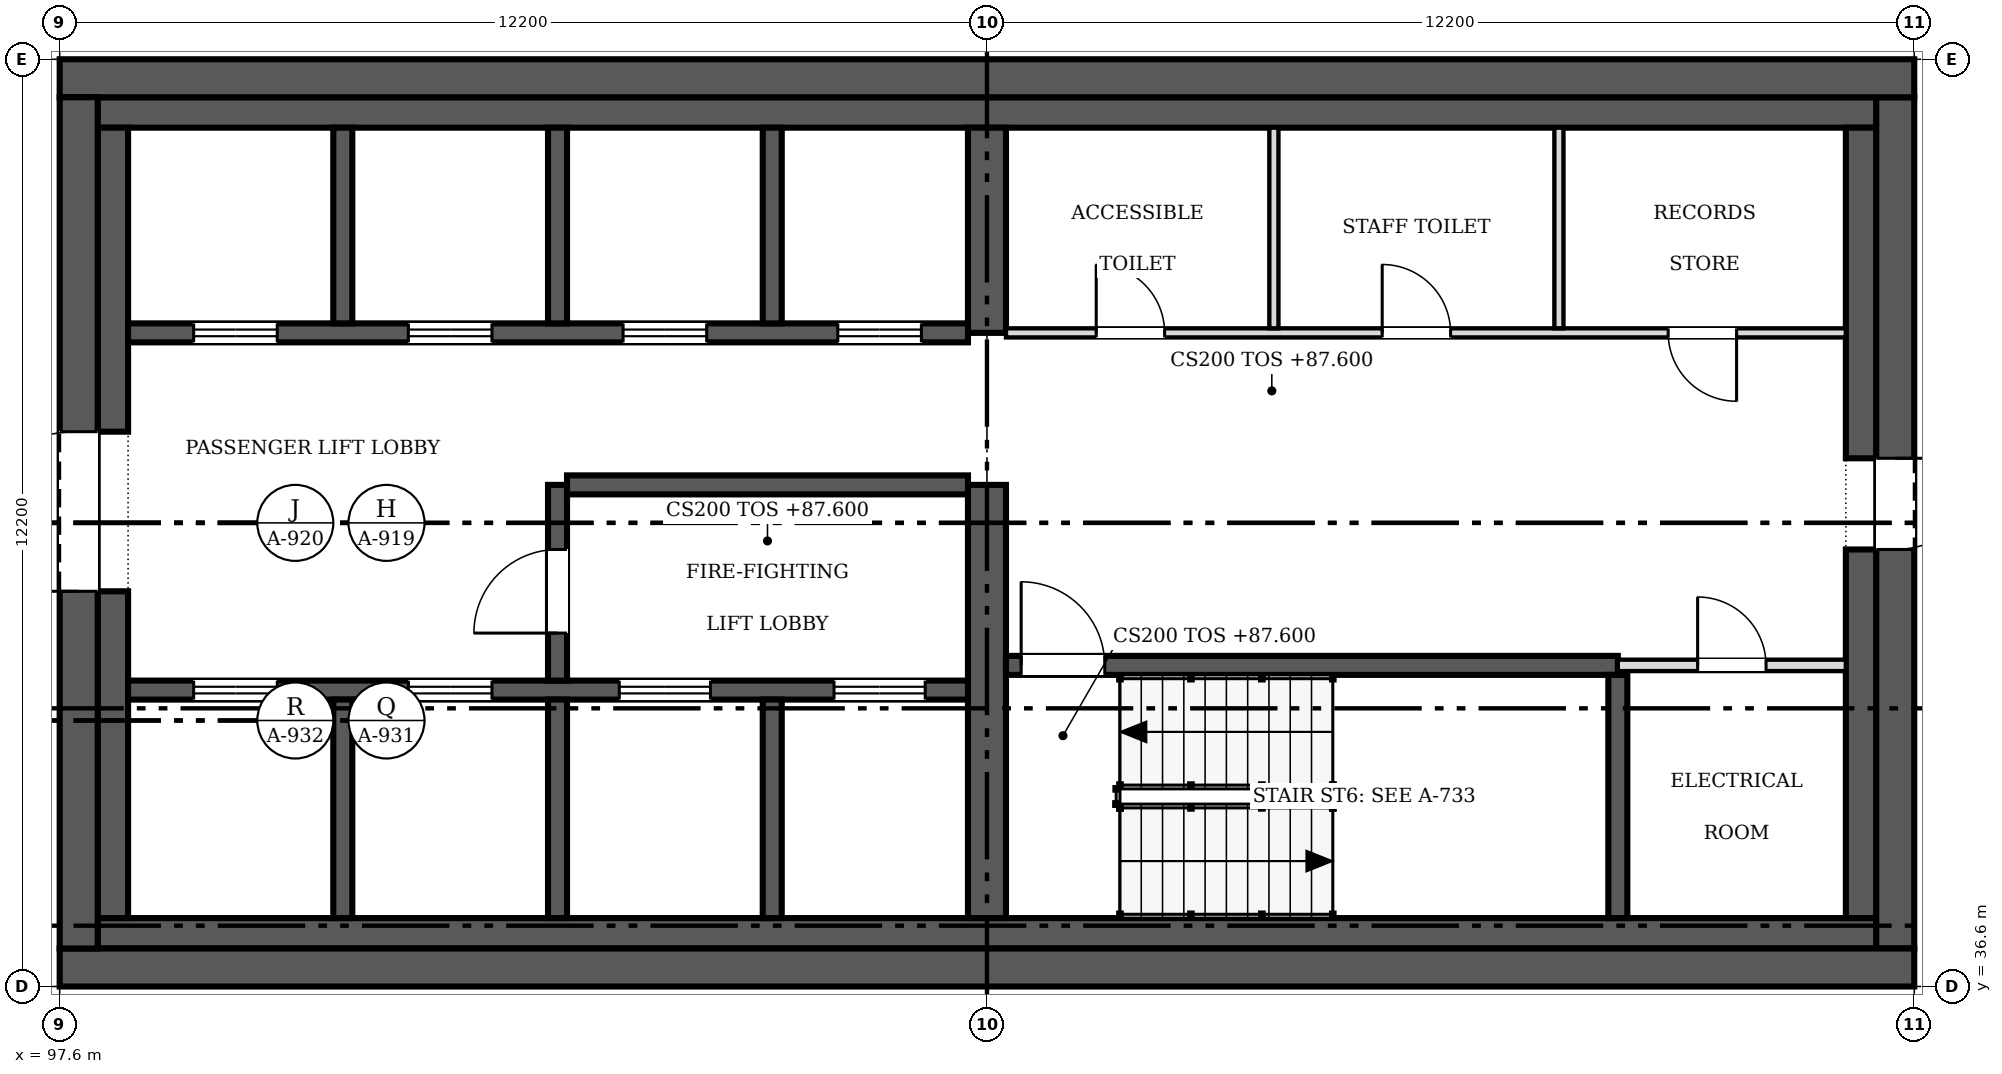
"""IFC4 building model, lengths in metres.
Left out: names, types, materials, properties, quantities, classifications, styles, units other than length and angle.
Written with IfcOpenShell. Run it as: python <this file> out.ifc"""

import sys

from ifc_helpers import new_model, si_unit, direction, frame, frame_2d, origin, place, context, subcontext, project, spatial, rectangle, extrude, source, transform, mapped, element, fill, save


model = new_model("IFC4")
c1 = context("Model", 3, precision=1e-05, world=origin(), true_north=direction((0.0, 1.0)))
c2 = subcontext(c1, "Body", "Model", "MODEL_VIEW")
j1 = project(units=[si_unit("LENGTHUNIT", "METRE"), si_unit("PLANEANGLEUNIT", "RADIAN")], contexts=[c1])
p1 = place(None, origin())
s1 = spatial("IfcSite", under=j1, at=p1, CompositionType="ELEMENT")
p2 = place(p1, origin())
s2 = spatial("IfcBuilding", under=s1, at=p2, CompositionType="ELEMENT")
p3 = place(p2, frame((0.0, 0.0, 87.6)))
s3 = spatial("IfcBuildingStorey", under=s2, at=p3, CompositionType="ELEMENT", Elevation=87.6)
p4 = place(p3, frame((122.0, 36.85, 0.0), z_axis=(0.0, 0.0, 1.0), x_axis=(-1.0, 0.0, 0.0)))
e1 = element("IfcWall", 1, at=p4, inside=s3, PredefinedType="SHEAR", context=c2, shape_type="SweptSolid", body=[
    extrude(rectangle(XDim=24.4, YDim=0.5, at=frame_2d((12.2, 0.0))), origin(), (0.0, 0.0, 1.0), 3.8),
])
p5 = place(p3, frame((97.85, 37.1, 0.0), z_axis=(0.0, 0.0, 1.0), x_axis=(0.0, 1.0, 0.0)))
e2 = element("IfcWall", 2, at=p5, inside=s3, PredefinedType="SHEAR", context=c2, shape_type="SweptSolid", body=[
    extrude(rectangle(XDim=11.2, YDim=0.5, at=frame_2d((5.6, 0.0))), origin(), (0.0, 0.0, 1.0), 3.8),
])
m1 = source(origin(), c2, "Body", "SweptSolid", [
    extrude(rectangle(XDim=2.1, YDim=2.4, at=frame_2d((1.05, 1.2))), frame((0.0, 0.26, 0.0), z_axis=(0.0, -1.0, 0.0), x_axis=(1.0, 0.0, 0.0)), (0.0, 0.0, 1.0), 0.52),
])
p6 = place(p5, frame((4.7, 0.0, 0.0)))
e3 = element("IfcOpeningElement", 3, at=p6, cuts=e2, PredefinedType="OPENING", context=c2, shape_type="MappedRepresentation", body=[
    mapped(m1, transform((0.0, 0.0, 0.0), scale=1.0)),
])
p7 = place(p3, frame((97.6, 48.55, 0.0), z_axis=(0.0, 0.0, 1.0), x_axis=(1.0, 0.0, 0.0)))
e4 = element("IfcWall", 4, at=p7, inside=s3, PredefinedType="SHEAR", context=c2, shape_type="SweptSolid", body=[
    extrude(rectangle(XDim=24.4, YDim=0.5, at=frame_2d((12.2, 0.0))), origin(), (0.0, 0.0, 1.0), 3.8),
])
p8 = place(p3, frame((121.75, 48.3, 0.0), z_axis=(0.0, 0.0, 1.0), x_axis=(0.0, -1.0, 0.0)))
e5 = element("IfcWall", 5, at=p8, inside=s3, PredefinedType="SHEAR", context=c2, shape_type="SweptSolid", body=[
    extrude(rectangle(XDim=11.2, YDim=0.5, at=frame_2d((5.6, 0.0))), origin(), (0.0, 0.0, 1.0), 3.8),
])
m2 = source(origin(), c2, "Body", "SweptSolid", [
    extrude(rectangle(XDim=1.2, YDim=2.1, at=frame_2d((0.6, 1.05))), frame((0.0, 0.26, 0.0), z_axis=(0.0, -1.0, 0.0), x_axis=(1.0, 0.0, 0.0)), (0.0, 0.0, 1.0), 0.52),
])
p9 = place(p8, frame((4.75, 0.0, 0.0)))
e6 = element("IfcOpeningElement", 6, at=p9, cuts=e5, PredefinedType="OPENING", context=c2, shape_type="MappedRepresentation", body=[
    mapped(m2, transform((0.0, 0.0, 0.0), scale=1.0)),
])
for number, where, z_axis, x_axis in (
    (7, (98.1, 37.3, 0.0), (0.0, 0.0, 1.0), (1.0, 0.0, 0.0)),
    (8, (98.1, 48.1, 0.0), (0.0, 0.0, 1.0), (1.0, 0.0, 0.0)),
):
    element("IfcWall", number, at=place(p3, frame(where, z_axis=z_axis, x_axis=x_axis)), inside=s3, PredefinedType="SOLIDWALL", context=c2, shape_type="SweptSolid", body=[
        extrude(rectangle(XDim=23.4, YDim=0.4, at=frame_2d((11.7, 0.0))), origin(), (0.0, 0.0, 1.0), 3.8),
    ])
p10 = place(p3, frame((98.3, 37.5, 0.0), z_axis=(0.0, 0.0, 1.0), x_axis=(0.0, 1.0, 0.0)))
e9 = element("IfcWall", 9, at=p10, inside=s3, PredefinedType="SOLIDWALL", context=c2, shape_type="SweptSolid", body=[
    extrude(rectangle(XDim=4.3, YDim=0.4, at=frame_2d((2.15, 0.0))), origin(), (0.0, 0.0, 1.0), 3.8),
])
p11 = place(p3, frame((98.3, 43.9, 0.0), z_axis=(0.0, 0.0, 1.0), x_axis=(0.0, 1.0, 0.0)))
e10 = element("IfcWall", 10, at=p11, inside=s3, PredefinedType="SOLIDWALL", context=c2, shape_type="SweptSolid", body=[
    extrude(rectangle(XDim=4.0, YDim=0.4, at=frame_2d((2.0, 0.0))), origin(), (0.0, 0.0, 1.0), 3.8),
])
p12 = place(p3, frame((121.3, 37.5, 0.0), z_axis=(0.0, 0.0, 1.0), x_axis=(0.0, 1.0, 0.0)))
e11 = element("IfcWall", 11, at=p12, inside=s3, PredefinedType="SOLIDWALL", context=c2, shape_type="SweptSolid", body=[
    extrude(rectangle(XDim=4.85, YDim=0.4, at=frame_2d((2.425, 0.0))), origin(), (0.0, 0.0, 1.0), 3.8),
])
p13 = place(p3, frame((121.3, 43.55, 0.0), z_axis=(0.0, 0.0, 1.0), x_axis=(0.0, 1.0, 0.0)))
e12 = element("IfcWall", 12, at=p13, inside=s3, PredefinedType="SOLIDWALL", context=c2, shape_type="SweptSolid", body=[
    extrude(rectangle(XDim=4.35, YDim=0.4, at=frame_2d((2.175, 0.0))), origin(), (0.0, 0.0, 1.0), 3.8),
])
p14 = place(p3, frame((109.8, 37.5, 0.0), z_axis=(0.0, 0.0, 1.0), x_axis=(0.0, 1.0, 0.0)))
e13 = element("IfcWall", 13, at=p14, inside=s3, PredefinedType="SHEAR", context=c2, shape_type="SweptSolid", body=[
    extrude(rectangle(XDim=5.7, YDim=0.5, at=frame_2d((2.85, 0.0))), origin(), (0.0, 0.0, 1.0), 3.8),
])
p15 = place(p3, frame((109.8, 45.2, 0.0), z_axis=(0.0, 0.0, 1.0), x_axis=(0.0, 1.0, 0.0)))
e14 = element("IfcWall", 14, at=p15, inside=s3, PredefinedType="SHEAR", context=c2, shape_type="SweptSolid", body=[
    extrude(rectangle(XDim=2.7, YDim=0.5, at=frame_2d((1.35, 0.0))), origin(), (0.0, 0.0, 1.0), 3.8),
])
p16 = place(p3, frame((98.5, 40.5, 0.0), z_axis=(0.0, 0.0, 1.0), x_axis=(1.0, 0.0, 0.0)))
e15 = element("IfcWall", 15, at=p16, inside=s3, PredefinedType="SOLIDWALL", context=c2, shape_type="SweptSolid", body=[
    extrude(rectangle(XDim=11.05, YDim=0.25, at=frame_2d((5.525, 0.0))), origin(), (0.0, 0.0, 1.0), 3.8),
])
m3 = source(origin(), c2, "Body", "SweptSolid", [
    extrude(rectangle(XDim=1.1, YDim=2.1, at=frame_2d((0.55, 1.05))), frame((0.0, 0.135, 0.0), z_axis=(0.0, -1.0, 0.0), x_axis=(1.0, 0.0, 0.0)), (0.0, 0.0, 1.0), 0.27),
])
p17 = place(p16, frame((0.863, 0.0, 0.0)))
e16 = element("IfcOpeningElement", 16, at=p17, cuts=e15, PredefinedType="OPENING", context=c2, shape_type="MappedRepresentation", body=[
    mapped(m3, transform((0.0, 0.0, 0.0), scale=1.0)),
])
p18 = place(p16, frame((3.688, 0.0, 0.0)))
e17 = element("IfcOpeningElement", 17, at=p18, cuts=e15, PredefinedType="OPENING", context=c2, shape_type="MappedRepresentation", body=[
    mapped(m3, transform((0.0, 0.0, 0.0), scale=1.0)),
])
m4 = source(origin(), c2, "Body", "SweptSolid", [
    extrude(rectangle(XDim=1.2, YDim=2.1, at=frame_2d((0.6, 1.05))), frame((0.0, 0.135, 0.0), z_axis=(0.0, -1.0, 0.0), x_axis=(1.0, 0.0, 0.0)), (0.0, 0.0, 1.0), 0.27),
])
p19 = place(p16, frame((6.462, 0.0, 0.0)))
e18 = element("IfcOpeningElement", 18, at=p19, cuts=e15, PredefinedType="OPENING", context=c2, shape_type="MappedRepresentation", body=[
    mapped(m4, transform((0.0, 0.0, 0.0), scale=1.0)),
])
p20 = place(p16, frame((9.288, 0.0, 0.0)))
e19 = element("IfcOpeningElement", 19, at=p20, cuts=e15, PredefinedType="OPENING", context=c2, shape_type="MappedRepresentation", body=[
    mapped(m4, transform((0.0, 0.0, 0.0), scale=1.0)),
])
p21 = place(p3, frame((109.55, 45.2, 0.0), z_axis=(0.0, 0.0, 1.0), x_axis=(-1.0, 0.0, 0.0)))
e20 = element("IfcWall", 20, at=p21, inside=s3, PredefinedType="SOLIDWALL", context=c2, shape_type="SweptSolid", body=[
    extrude(rectangle(XDim=11.05, YDim=0.25, at=frame_2d((5.525, 0.0))), origin(), (0.0, 0.0, 1.0), 3.8),
])
p22 = place(p21, frame((9.087, 0.0, 0.0)))
e21 = element("IfcOpeningElement", 21, at=p22, cuts=e20, PredefinedType="OPENING", context=c2, shape_type="MappedRepresentation", body=[
    mapped(m3, transform((0.0, 0.0, 0.0), scale=1.0)),
])
p23 = place(p21, frame((6.262, 0.0, 0.0)))
e22 = element("IfcOpeningElement", 22, at=p23, cuts=e20, PredefinedType="OPENING", context=c2, shape_type="MappedRepresentation", body=[
    mapped(m3, transform((0.0, 0.0, 0.0), scale=1.0)),
])
p24 = place(p21, frame((3.438, 0.0, 0.0)))
e23 = element("IfcOpeningElement", 23, at=p24, cuts=e20, PredefinedType="OPENING", context=c2, shape_type="MappedRepresentation", body=[
    mapped(m3, transform((0.0, 0.0, 0.0), scale=1.0)),
])
p25 = place(p21, frame((0.613, 0.0, 0.0)))
e24 = element("IfcOpeningElement", 24, at=p25, cuts=e20, PredefinedType="OPENING", context=c2, shape_type="MappedRepresentation", body=[
    mapped(m3, transform((0.0, 0.0, 0.0), scale=1.0)),
])
p26 = place(p3, frame((118.1, 40.825, 0.0), z_axis=(0.0, 0.0, 1.0), x_axis=(-1.0, 0.0, 0.0)))
e25 = element("IfcWall", 25, at=p26, inside=s3, PredefinedType="SOLIDWALL", context=c2, shape_type="SweptSolid", body=[
    extrude(rectangle(XDim=8.05, YDim=0.25, at=frame_2d((4.025, 0.0))), origin(), (0.0, 0.0, 1.0), 3.8),
])
p27 = place(p26, frame((6.75, 0.0, 0.0)))
e26 = element("IfcOpeningElement", 26, at=p27, cuts=e25, PredefinedType="OPENING", context=c2, shape_type="MappedRepresentation", body=[
    mapped(m3, transform((0.0, 0.0, 0.0), scale=1.0)),
])
p28 = place(p3, frame((104.15, 37.5, 0.0), z_axis=(0.0, 0.0, 1.0), x_axis=(0.0, 1.0, 0.0)))
e27 = element("IfcWall", 27, at=p28, inside=s3, PredefinedType="SOLIDWALL", context=c2, shape_type="SweptSolid", body=[
    extrude(rectangle(XDim=2.875, YDim=0.25, at=frame_2d((1.438, 0.0))), origin(), (0.0, 0.0, 1.0), 3.8),
])
p29 = place(p3, frame((104.15, 43.2, 0.0), z_axis=(0.0, 0.0, 1.0), x_axis=(0.0, -1.0, 0.0)))
e28 = element("IfcWall", 28, at=p29, inside=s3, PredefinedType="SOLIDWALL", context=c2, shape_type="SweptSolid", body=[
    extrude(rectangle(XDim=2.575, YDim=0.25, at=frame_2d((1.288, 0.0))), origin(), (0.0, 0.0, 1.0), 3.8),
])
p30 = place(p29, frame((0.85, 0.0, 0.0)))
e29 = element("IfcOpeningElement", 29, at=p30, cuts=e28, PredefinedType="OPENING", context=c2, shape_type="MappedRepresentation", body=[
    mapped(m3, transform((0.0, 0.0, 0.0), scale=1.0)),
])
p31 = place(p3, frame((104.275, 43.2, 0.0), z_axis=(0.0, 0.0, 1.0), x_axis=(1.0, 0.0, 0.0)))
e30 = element("IfcWall", 30, at=p31, inside=s3, PredefinedType="SOLIDWALL", context=c2, shape_type="SweptSolid", body=[
    extrude(rectangle(XDim=5.275, YDim=0.25, at=frame_2d((2.638, 0.0))), origin(), (0.0, 0.0, 1.0), 3.8),
])
p32 = place(p3, frame((118.1, 37.5, 0.0), z_axis=(0.0, 0.0, 1.0), x_axis=(0.0, 1.0, 0.0)))
e31 = element("IfcWall", 31, at=p32, inside=s3, PredefinedType="SOLIDWALL", context=c2, shape_type="SweptSolid", body=[
    extrude(rectangle(XDim=3.2, YDim=0.25, at=frame_2d((1.6, 0.0))), origin(), (0.0, 0.0, 1.0), 3.8),
])
for number, where, z_axis, x_axis in (
    (32, (101.325, 37.5, 0.0), (0.0, 0.0, 1.0), (0.0, 1.0, 0.0)),
    (33, (106.975, 37.5, 0.0), (0.0, 0.0, 1.0), (0.0, 1.0, 0.0)),
):
    element("IfcWall", number, at=place(p3, frame(where, z_axis=z_axis, x_axis=x_axis)), inside=s3, PredefinedType="SOLIDWALL", context=c2, shape_type="SweptSolid", body=[
        extrude(rectangle(XDim=2.875, YDim=0.25, at=frame_2d((1.438, 0.0))), origin(), (0.0, 0.0, 1.0), 3.8),
    ])
for number, where, z_axis, x_axis in (
    (34, (101.325, 45.325, 0.0), (0.0, 0.0, 1.0), (0.0, 1.0, 0.0)),
    (35, (104.15, 45.325, 0.0), (0.0, 0.0, 1.0), (0.0, 1.0, 0.0)),
    (36, (106.975, 45.325, 0.0), (0.0, 0.0, 1.0), (0.0, 1.0, 0.0)),
):
    element("IfcWall", number, at=place(p3, frame(where, z_axis=z_axis, x_axis=x_axis)), inside=s3, PredefinedType="SOLIDWALL", context=c2, shape_type="SweptSolid", body=[
        extrude(rectangle(XDim=2.575, YDim=0.25, at=frame_2d((1.288, 0.0))), origin(), (0.0, 0.0, 1.0), 3.8),
    ])
p33 = place(p3, frame((110.05, 45.2, 0.0), z_axis=(0.0, 0.0, 1.0), x_axis=(1.0, 0.0, 0.0)))
e37 = element("IfcWall", 37, at=p33, inside=s3, PredefinedType="PARTITIONING", context=c2, shape_type="SweptSolid", body=[
    extrude(rectangle(XDim=11.05, YDim=0.12, at=frame_2d((5.525, 0.0))), origin(), (0.0, 0.0, 1.0), 3.6),
])
m5 = source(origin(), c2, "Body", "SweptSolid", [
    extrude(rectangle(XDim=0.9, YDim=2.1, at=frame_2d((0.45, 1.05))), frame((0.0, 0.07, 0.0), z_axis=(0.0, -1.0, 0.0), x_axis=(1.0, 0.0, 0.0)), (0.0, 0.0, 1.0), 0.14),
])
p34 = place(p33, frame((1.188, 0.0, 0.0)))
e38 = element("IfcOpeningElement", 38, at=p34, cuts=e37, PredefinedType="OPENING", context=c2, shape_type="MappedRepresentation", body=[
    mapped(m5, transform((0.0, 0.0, 0.0), scale=1.0)),
])
p35 = place(p33, frame((4.95, 0.0, 0.0)))
e39 = element("IfcOpeningElement", 39, at=p35, cuts=e37, PredefinedType="OPENING", context=c2, shape_type="MappedRepresentation", body=[
    mapped(m5, transform((0.0, 0.0, 0.0), scale=1.0)),
])
p36 = place(p33, frame((8.712, 0.0, 0.0)))
e40 = element("IfcOpeningElement", 40, at=p36, cuts=e37, PredefinedType="OPENING", context=c2, shape_type="MappedRepresentation", body=[
    mapped(m5, transform((0.0, 0.0, 0.0), scale=1.0)),
])
p37 = place(p3, frame((121.1, 40.825, 0.0), z_axis=(0.0, 0.0, 1.0), x_axis=(-1.0, 0.0, 0.0)))
e41 = element("IfcWall", 41, at=p37, inside=s3, PredefinedType="PARTITIONING", context=c2, shape_type="SweptSolid", body=[
    extrude(rectangle(XDim=3.0, YDim=0.15, at=frame_2d((1.5, 0.0))), origin(), (0.0, 0.0, 1.0), 3.6),
])
m6 = source(origin(), c2, "Body", "SweptSolid", [
    extrude(rectangle(XDim=0.9, YDim=2.1, at=frame_2d((0.45, 1.05))), frame((0.0, 0.085, 0.0), z_axis=(0.0, -1.0, 0.0), x_axis=(1.0, 0.0, 0.0)), (0.0, 0.0, 1.0), 0.17),
])
p38 = place(p37, frame((1.05, 0.0, 0.0)))
e42 = element("IfcOpeningElement", 42, at=p38, cuts=e41, PredefinedType="OPENING", context=c2, shape_type="MappedRepresentation", body=[
    mapped(m6, transform((0.0, 0.0, 0.0), scale=1.0)),
])
for number, where, z_axis, x_axis in (
    (43, (113.575, 45.26, 0.0), (0.0, 0.0, 1.0), (0.0, 1.0, 0.0)),
    (44, (117.325, 45.26, 0.0), (0.0, 0.0, 1.0), (0.0, 1.0, 0.0)),
):
    element("IfcWall", number, at=place(p3, frame(where, z_axis=z_axis, x_axis=x_axis)), inside=s3, PredefinedType="PARTITIONING", context=c2, shape_type="SweptSolid", body=[
        extrude(rectangle(XDim=2.64, YDim=0.12, at=frame_2d((1.32, 0.0))), origin(), (0.0, 0.0, 1.0), 3.6),
    ])
m7 = source(origin(), c2, "Body", "SweptSolid", [
    extrude(rectangle(XDim=2.1, YDim=2.4, at=frame_2d((1.05, 1.2))), frame((0.0, 0.025, 0.0), z_axis=(0.0, -1.0, 0.0), x_axis=(1.0, 0.0, 0.0)), (0.0, 0.0, 1.0), 0.05),
])
p39 = place(p6, origin())
e45 = element("IfcDoor", 45, at=p39, inside=s3, OperationType="DOUBLE_DOOR_SINGLE_SWING", PredefinedType="DOOR", context=c2, shape_type="MappedRepresentation", body=[
    mapped(m7, transform((0.0, 0.0, 0.0), scale=1.0)),
])
fill(e3, e45)
m8 = source(origin(), c2, "Body", "SweptSolid", [
    extrude(rectangle(XDim=1.2, YDim=2.1, at=frame_2d((0.6, 1.05))), frame((0.0, 0.025, 0.0), z_axis=(0.0, -1.0, 0.0), x_axis=(1.0, 0.0, 0.0)), (0.0, 0.0, 1.0), 0.05),
])
p40 = place(p9, origin())
e46 = element("IfcDoor", 46, at=p40, inside=s3, OperationType="SINGLE_SWING_LEFT", PredefinedType="DOOR", context=c2, shape_type="MappedRepresentation", body=[
    mapped(m8, transform((0.0, 0.0, 0.0), scale=1.0)),
])
fill(e6, e46)
m9 = source(origin(), c2, "Body", "SweptSolid", [
    extrude(rectangle(XDim=1.1, YDim=2.1, at=frame_2d((0.55, 1.05))), frame((0.0, 0.025, 0.0), z_axis=(0.0, -1.0, 0.0), x_axis=(1.0, 0.0, 0.0)), (0.0, 0.0, 1.0), 0.05),
])
p41 = place(p17, origin())
e47 = element("IfcDoor", 47, at=p41, inside=s3, OperationType="DOUBLE_DOOR_SLIDING", PredefinedType="DOOR", context=c2, shape_type="MappedRepresentation", body=[
    mapped(m9, transform((0.0, 0.0, 0.0), scale=1.0)),
])
fill(e16, e47)
p42 = place(p18, origin())
e48 = element("IfcDoor", 48, at=p42, inside=s3, OperationType="DOUBLE_DOOR_SLIDING", PredefinedType="DOOR", context=c2, shape_type="MappedRepresentation", body=[
    mapped(m9, transform((0.0, 0.0, 0.0), scale=1.0)),
])
fill(e17, e48)
p43 = place(p19, origin())
e49 = element("IfcDoor", 49, at=p43, inside=s3, OperationType="DOUBLE_DOOR_SLIDING", PredefinedType="DOOR", context=c2, shape_type="MappedRepresentation", body=[
    mapped(m8, transform((0.0, 0.0, 0.0), scale=1.0)),
])
fill(e18, e49)
p44 = place(p20, origin())
e50 = element("IfcDoor", 50, at=p44, inside=s3, OperationType="DOUBLE_DOOR_SLIDING", PredefinedType="DOOR", context=c2, shape_type="MappedRepresentation", body=[
    mapped(m8, transform((0.0, 0.0, 0.0), scale=1.0)),
])
fill(e19, e50)
p45 = place(p22, origin())
e51 = element("IfcDoor", 51, at=p45, inside=s3, OperationType="DOUBLE_DOOR_SLIDING", PredefinedType="DOOR", context=c2, shape_type="MappedRepresentation", body=[
    mapped(m9, transform((0.0, 0.0, 0.0), scale=1.0)),
])
fill(e21, e51)
p46 = place(p23, origin())
e52 = element("IfcDoor", 52, at=p46, inside=s3, OperationType="DOUBLE_DOOR_SLIDING", PredefinedType="DOOR", context=c2, shape_type="MappedRepresentation", body=[
    mapped(m9, transform((0.0, 0.0, 0.0), scale=1.0)),
])
fill(e22, e52)
p47 = place(p24, origin())
e53 = element("IfcDoor", 53, at=p47, inside=s3, OperationType="DOUBLE_DOOR_SLIDING", PredefinedType="DOOR", context=c2, shape_type="MappedRepresentation", body=[
    mapped(m9, transform((0.0, 0.0, 0.0), scale=1.0)),
])
fill(e23, e53)
p48 = place(p25, origin())
e54 = element("IfcDoor", 54, at=p48, inside=s3, OperationType="DOUBLE_DOOR_SLIDING", PredefinedType="DOOR", context=c2, shape_type="MappedRepresentation", body=[
    mapped(m9, transform((0.0, 0.0, 0.0), scale=1.0)),
])
fill(e24, e54)
p49 = place(p27, origin())
e55 = element("IfcDoor", 55, at=p49, inside=s3, OperationType="SINGLE_SWING_RIGHT", PredefinedType="DOOR", context=c2, shape_type="MappedRepresentation", body=[
    mapped(m9, transform((0.0, 0.0, 0.0), scale=1.0)),
])
fill(e26, e55)
p50 = place(p30, origin())
e56 = element("IfcDoor", 56, at=p50, inside=s3, OperationType="SINGLE_SWING_RIGHT", PredefinedType="DOOR", context=c2, shape_type="MappedRepresentation", body=[
    mapped(m9, transform((0.0, 0.0, 0.0), scale=1.0)),
])
fill(e29, e56)
m10 = source(origin(), c2, "Body", "SweptSolid", [
    extrude(rectangle(XDim=0.9, YDim=2.1, at=frame_2d((0.45, 1.05))), frame((0.0, 0.025, 0.0), z_axis=(0.0, -1.0, 0.0), x_axis=(1.0, 0.0, 0.0)), (0.0, 0.0, 1.0), 0.05),
])
p51 = place(p34, origin())
e57 = element("IfcDoor", 57, at=p51, inside=s3, OperationType="SINGLE_SWING_LEFT", PredefinedType="DOOR", context=c2, shape_type="MappedRepresentation", body=[
    mapped(m10, transform((0.0, 0.0, 0.0), scale=1.0)),
])
fill(e38, e57)
p52 = place(p35, origin())
e58 = element("IfcDoor", 58, at=p52, inside=s3, OperationType="SINGLE_SWING_LEFT", PredefinedType="DOOR", context=c2, shape_type="MappedRepresentation", body=[
    mapped(m10, transform((0.0, 0.0, 0.0), scale=1.0)),
])
fill(e39, e58)
p53 = place(p36, origin())
e59 = element("IfcDoor", 59, at=p53, inside=s3, OperationType="SINGLE_SWING_RIGHT", PredefinedType="DOOR", context=c2, shape_type="MappedRepresentation", body=[
    mapped(m10, transform((0.0, 0.0, 0.0), scale=1.0)),
])
fill(e40, e59)
p54 = place(p38, origin())
e60 = element("IfcDoor", 60, at=p54, inside=s3, OperationType="SINGLE_SWING_RIGHT", PredefinedType="DOOR", context=c2, shape_type="MappedRepresentation", body=[
    mapped(m10, transform((0.0, 0.0, 0.0), scale=1.0)),
])
fill(e42, e60)
save(model, sys.argv[1])
